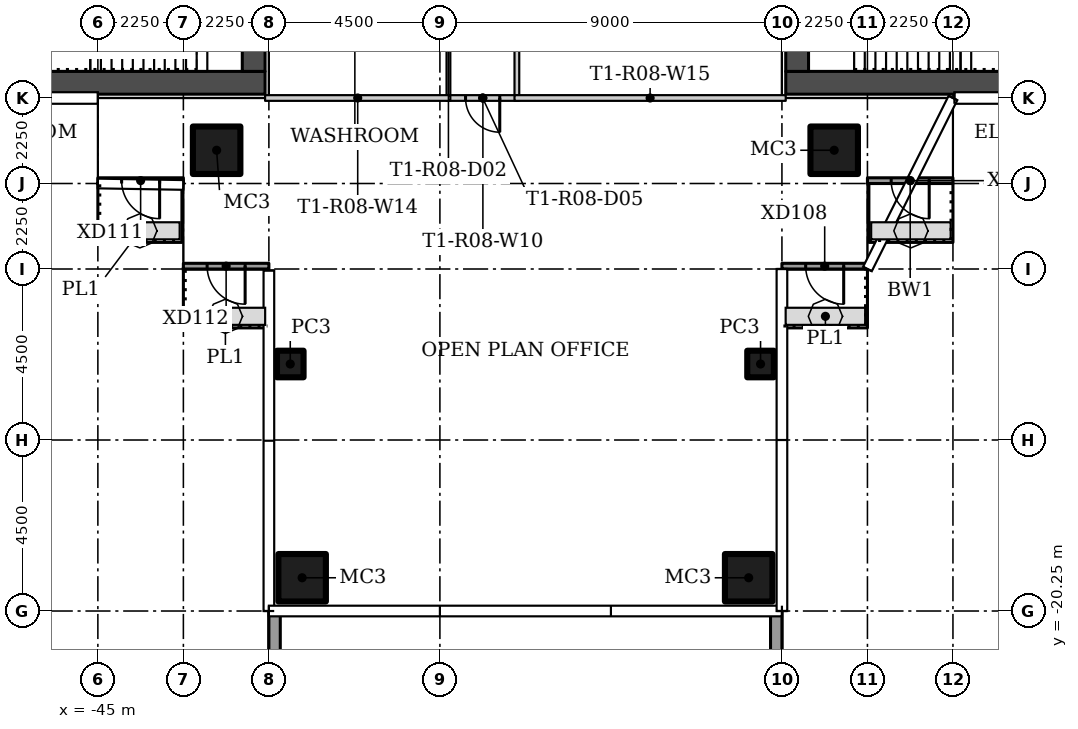
"""IFC4 building model, lengths in metres.
Left out: names, types, materials, properties, quantities, classifications, styles, units other than length and angle.
Written with IfcOpenShell. Run it as: python <this file> out.ifc"""

import sys

from ifc_helpers import new_model, si_unit, direction, frame, frame_2d, origin, origin_2d, place, context, subcontext, project, spatial, rectangle, hollow_rectangle, extrude, element, fill, save


model = new_model("IFC4")
c1 = context("Model", 3, precision=1e-05, world=origin(), true_north=direction((0.0, 1.0)))
c2 = subcontext(c1, "Body", "Model", "MODEL_VIEW")
j1 = project(units=[si_unit("LENGTHUNIT", "METRE"), si_unit("PLANEANGLEUNIT", "RADIAN")], contexts=[c1])
p1 = place(None, origin())
s1 = spatial("IfcSite", under=j1, at=p1, CompositionType="ELEMENT")
p2 = place(p1, origin())
s2 = spatial("IfcBuilding", under=s1, at=p2, CompositionType="ELEMENT")
p3 = place(p2, frame((0.0, 0.0, 81.9)))
s3 = spatial("IfcBuildingStorey", under=s2, at=p3, CompositionType="ELEMENT", Elevation=81.9)
for number, where in (
    (1, (-25.625, -8.125, 0.0)),
    (2, (-41.875, -8.125, 0.0)),
):
    element("IfcColumn", number, at=place(p3, frame(where)), inside=s3, PredefinedType="COLUMN", context=c2, shape_type="SweptSolid", body=[
        extrude(hollow_rectangle(XDim=1.25, YDim=1.25, WallThickness=0.05, at=origin_2d()), origin(), (0.0, 0.0, 1.0), 3.55),
    ])
p4 = place(p3, frame((-39.938, -13.75, 0.0)))
e3 = element("IfcColumn", 3, at=p4, inside=s3, PredefinedType="COLUMN", context=c2, shape_type="SweptSolid", body=[
    extrude(hollow_rectangle(XDim=0.7, YDim=0.7, WallThickness=0.025, at=origin_2d()), origin(), (0.0, 0.0, 1.0), 3.55),
])
p5 = place(p3, frame((-39.625, -19.375, 0.0)))
e4 = element("IfcColumn", 4, at=p5, inside=s3, PredefinedType="COLUMN", context=c2, shape_type="SweptSolid", body=[
    extrude(hollow_rectangle(XDim=1.25, YDim=1.25, WallThickness=0.05, at=origin_2d()), origin(), (0.0, 0.0, 1.0), 3.55),
])
p6 = place(p3, frame((-27.562, -13.75, 0.0)))
e5 = element("IfcColumn", 5, at=p6, inside=s3, PredefinedType="COLUMN", context=c2, shape_type="SweptSolid", body=[
    extrude(hollow_rectangle(XDim=0.7, YDim=0.7, WallThickness=0.025, at=origin_2d()), origin(), (0.0, 0.0, 1.0), 3.55),
])
p7 = place(p3, frame((-27.875, -19.375, 0.0)))
e6 = element("IfcColumn", 6, at=p7, inside=s3, PredefinedType="COLUMN", context=c2, shape_type="SweptSolid", body=[
    extrude(hollow_rectangle(XDim=1.25, YDim=1.25, WallThickness=0.05, at=origin_2d()), origin(), (0.0, 0.0, 1.0), 3.55),
])
p8 = place(p3, frame((-33.975, -0.013, 0.0), z_axis=(0.0, 0.0, 1.0), x_axis=(0.0, -1.0, 0.0)))
e7 = element("IfcWall", 7, at=p8, inside=s3, PredefinedType="PARTITIONING", context=c2, shape_type="SweptSolid", body=[
    extrude(rectangle(XDim=6.662, YDim=0.125, at=frame_2d((3.331, 0.0))), origin(), (0.0, 0.0, 1.0), 3.55),
])
p9 = place(p8, frame((2.887, 0.0, 0.0)))
e8 = element("IfcOpeningElement", 8, at=p9, cuts=e7, PredefinedType="OPENING", context=c2, shape_type="SweptSolid", body=[
    extrude(rectangle(XDim=0.9, YDim=2.1, at=frame_2d((0.45, 1.05))), frame((0.0, 0.073, 0.0), z_axis=(0.0, -1.0, 0.0), x_axis=(1.0, 0.0, 0.0)), (0.0, 0.0, 1.0), 0.145),
])
p10 = place(p3, frame((-35.775, -6.675, 0.0), z_axis=(0.0, 0.0, 1.0), x_axis=(0.0, 1.0, 0.0)))
e9 = element("IfcWall", 9, at=p10, inside=s3, PredefinedType="PARTITIONING", context=c2, shape_type="SweptSolid", body=[
    extrude(rectangle(XDim=6.675, YDim=0.1, at=frame_2d((3.337, 0.0))), origin(), (0.0, 0.0, 1.0), 3.55),
])
p11 = place(p10, frame((1.35, 0.0, 0.0)))
e10 = element("IfcOpeningElement", 10, at=p11, cuts=e9, PredefinedType="OPENING", context=c2, shape_type="SweptSolid", body=[
    extrude(rectangle(XDim=0.9, YDim=2.1, at=frame_2d((0.45, 1.05))), frame((0.0, 0.06, 0.0), z_axis=(0.0, -1.0, 0.0), x_axis=(1.0, 0.0, 0.0)), (0.0, 0.0, 1.0), 0.12),
])
p12 = place(p3, frame((-33.912, -6.75, 0.0), z_axis=(0.0, 0.0, 1.0), x_axis=(-1.0, 0.0, 0.0)))
e11 = element("IfcWall", 11, at=p12, inside=s3, PredefinedType="PARTITIONING", context=c2, shape_type="SweptSolid", body=[
    extrude(rectangle(XDim=1.913, YDim=0.15, at=frame_2d((0.957, 0.0))), origin(), (0.0, 0.0, 1.0), 3.55),
])
p13 = place(p12, frame((0.513, 0.0, 0.0)))
e12 = element("IfcOpeningElement", 12, at=p13, cuts=e11, PredefinedType="OPENING", context=c2, shape_type="SweptSolid", body=[
    extrude(rectangle(XDim=0.9, YDim=2.1, at=frame_2d((0.45, 1.05))), frame((0.0, 0.085, 0.0), z_axis=(0.0, -1.0, 0.0), x_axis=(1.0, 0.0, 0.0)), (0.0, 0.0, 1.0), 0.17),
])
p14 = place(p3, frame((-40.6, -6.75, 0.0)))
e13 = element("IfcWall", 13, at=p14, inside=s3, PredefinedType="PARTITIONING", context=c2, shape_type="SweptSolid", body=[
    extrude(rectangle(XDim=4.875, YDim=0.15, at=frame_2d((2.438, 0.0))), origin(), (0.0, 0.0, 1.0), 3.55),
])
p15 = place(p3, frame((-34.037, -6.75, 0.0)))
e14 = element("IfcWall", 14, at=p15, inside=s3, PredefinedType="PARTITIONING", context=c2, shape_type="SweptSolid", body=[
    extrude(rectangle(XDim=7.137, YDim=0.15, at=frame_2d((3.569, 0.0))), origin(), (0.0, 0.0, 1.0), 3.55),
])
p16 = place(p3, frame((-40.35, -20.25, 0.0), z_axis=(0.0, 0.0, 1.0), x_axis=(0.0, -1.0, 0.0)))
e15 = element("IfcWall", 15, at=p16, inside=s3, PredefinedType="PARAPET", context=c2, shape_type="SweptSolid", body=[
    extrude(rectangle(XDim=4.5, YDim=0.3, at=frame_2d((2.25, 0.0))), origin(), (0.0, 0.0, 1.0), 1.1),
])
p17 = place(p3, frame((-27.15, -24.45, 0.0), z_axis=(0.0, 0.0, 1.0), x_axis=(0.0, 1.0, 0.0)))
e16 = element("IfcWall", 16, at=p17, inside=s3, PredefinedType="PARAPET", context=c2, shape_type="SweptSolid", body=[
    extrude(rectangle(XDim=4.2, YDim=0.3, at=frame_2d((2.1, 0.0))), origin(), (0.0, 0.0, 1.0), 1.1),
])
p18 = place(p3, frame((-22.5, -8.925, 0.0), z_axis=(0.0, 0.0, 1.0), x_axis=(-1.0, 0.0, 0.0)))
e17 = element("IfcWall", 17, at=p18, inside=s3, PredefinedType="SOLIDWALL", context=c2, shape_type="SweptSolid", body=[
    extrude(rectangle(XDim=2.25, YDim=0.15, at=frame_2d((1.125, 0.0))), origin(), (0.0, 0.0, 1.0), 3.45),
])
p19 = place(p18, frame((0.625, 0.0, 0.0)))
e18 = element("IfcOpeningElement", 18, at=p19, cuts=e17, PredefinedType="OPENING", context=c2, shape_type="SweptSolid", body=[
    extrude(rectangle(XDim=1.0, YDim=2.4, at=frame_2d((0.5, 1.2))), frame((0.0, 0.085, 0.0), z_axis=(0.0, -1.0, 0.0), x_axis=(1.0, 0.0, 0.0)), (0.0, 0.0, 1.0), 0.17),
])
p20 = place(p3, frame((-24.75, -11.175, 0.0), z_axis=(0.0, 0.0, 1.0), x_axis=(-1.0, 0.0, 0.0)))
e19 = element("IfcWall", 19, at=p20, inside=s3, PredefinedType="SOLIDWALL", context=c2, shape_type="SweptSolid", body=[
    extrude(rectangle(XDim=2.25, YDim=0.15, at=frame_2d((1.125, 0.0))), origin(), (0.0, 0.0, 1.0), 3.45),
])
p21 = place(p20, frame((0.625, 0.0, 0.0)))
e20 = element("IfcOpeningElement", 20, at=p21, cuts=e19, PredefinedType="OPENING", context=c2, shape_type="SweptSolid", body=[
    extrude(rectangle(XDim=1.0, YDim=2.4, at=frame_2d((0.5, 1.2))), frame((0.0, 0.085, 0.0), z_axis=(0.0, -1.0, 0.0), x_axis=(1.0, 0.0, 0.0)), (0.0, 0.0, 1.0), 0.17),
])
p22 = place(p3, frame((-42.75, -8.925, 0.0), z_axis=(0.0, 0.0, 1.0), x_axis=(-1.0, 0.0, 0.0)))
e21 = element("IfcWall", 21, at=p22, inside=s3, PredefinedType="SOLIDWALL", context=c2, shape_type="SweptSolid", body=[
    extrude(rectangle(XDim=2.25, YDim=0.15, at=frame_2d((1.125, 0.0))), origin(), (0.0, 0.0, 1.0), 3.45),
])
p23 = place(p22, frame((0.625, 0.0, 0.0)))
e22 = element("IfcOpeningElement", 22, at=p23, cuts=e21, PredefinedType="OPENING", context=c2, shape_type="SweptSolid", body=[
    extrude(rectangle(XDim=1.0, YDim=2.4, at=frame_2d((0.5, 1.2))), frame((0.0, 0.085, 0.0), z_axis=(0.0, -1.0, 0.0), x_axis=(1.0, 0.0, 0.0)), (0.0, 0.0, 1.0), 0.17),
])
p24 = place(p3, frame((-40.5, -11.175, 0.0), z_axis=(0.0, 0.0, 1.0), x_axis=(-1.0, 0.0, 0.0)))
e23 = element("IfcWall", 23, at=p24, inside=s3, PredefinedType="SOLIDWALL", context=c2, shape_type="SweptSolid", body=[
    extrude(rectangle(XDim=2.25, YDim=0.15, at=frame_2d((1.125, 0.0))), origin(), (0.0, 0.0, 1.0), 3.45),
])
p25 = place(p24, frame((0.625, 0.0, 0.0)))
e24 = element("IfcOpeningElement", 24, at=p25, cuts=e23, PredefinedType="OPENING", context=c2, shape_type="SweptSolid", body=[
    extrude(rectangle(XDim=1.0, YDim=2.4, at=frame_2d((0.5, 1.2))), frame((0.0, 0.085, 0.0), z_axis=(0.0, -1.0, 0.0), x_axis=(1.0, 0.0, 0.0)), (0.0, 0.0, 1.0), 0.17),
])
p26 = place(p3, frame((-26.9, -6.35, 0.0)))
e25 = element("IfcWall", 25, at=p26, inside=s3, PredefinedType="SHEAR", context=c2, shape_type="SweptSolid", body=[
    extrude(rectangle(XDim=13.3, YDim=0.6, at=frame_2d((6.65, 0.0))), origin(), (0.0, 0.0, 1.0), 3.55),
])
p27 = place(p3, frame((-26.6, 6.05, 0.0), z_axis=(0.0, 0.0, 1.0), x_axis=(0.0, -1.0, 0.0)))
e26 = element("IfcWall", 26, at=p27, inside=s3, PredefinedType="SHEAR", context=c2, shape_type="SweptSolid", body=[
    extrude(rectangle(XDim=12.1, YDim=0.6, at=frame_2d((6.05, 0.0))), origin(), (0.0, 0.0, 1.0), 3.55),
])
p28 = place(p27, frame((3.9, 0.0, 0.0)))
e27 = element("IfcOpeningElement", 27, at=p28, cuts=e26, PredefinedType="OPENING", context=c2, shape_type="SweptSolid", body=[
    extrude(rectangle(XDim=1.8, YDim=2.4, at=frame_2d((0.9, 1.2))), frame((0.0, 0.31, 0.0), z_axis=(0.0, -1.0, 0.0), x_axis=(1.0, 0.0, 0.0)), (0.0, 0.0, 1.0), 0.62),
])
p29 = place(p3, frame((-40.6, -6.35, 0.0), z_axis=(0.0, 0.0, 1.0), x_axis=(-1.0, 0.0, 0.0)))
e28 = element("IfcWall", 28, at=p29, inside=s3, PredefinedType="SHEAR", context=c2, shape_type="SweptSolid", body=[
    extrude(rectangle(XDim=13.3, YDim=0.6, at=frame_2d((6.65, 0.0))), origin(), (0.0, 0.0, 1.0), 3.55),
])
p30 = place(p3, frame((-40.9, -6.05, 0.0), z_axis=(0.0, 0.0, 1.0), x_axis=(0.0, 1.0, 0.0)))
e29 = element("IfcWall", 29, at=p30, inside=s3, PredefinedType="SHEAR", context=c2, shape_type="SweptSolid", body=[
    extrude(rectangle(XDim=12.1, YDim=0.6, at=frame_2d((6.05, 0.0))), origin(), (0.0, 0.0, 1.0), 3.55),
])
p31 = place(p30, frame((6.4, 0.0, 0.0)))
e30 = element("IfcOpeningElement", 30, at=p31, cuts=e29, PredefinedType="OPENING", context=c2, shape_type="SweptSolid", body=[
    extrude(rectangle(XDim=1.8, YDim=2.4, at=frame_2d((0.9, 1.2))), frame((0.0, 0.31, 0.0), z_axis=(0.0, -1.0, 0.0), x_axis=(1.0, 0.0, 0.0)), (0.0, 0.0, 1.0), 0.62),
])
p32 = place(p13, origin())
e31 = element("IfcDoor", 31, at=p32, inside=s3, OperationType="SINGLE_SWING_RIGHT", PredefinedType="DOOR", context=c2, shape_type="SweptSolid", body=[
    extrude(rectangle(XDim=0.9, YDim=2.1, at=frame_2d((0.45, 1.05))), frame((0.0, 0.025, 0.0), z_axis=(0.0, -1.0, 0.0), x_axis=(1.0, 0.0, 0.0)), (0.0, 0.0, 1.0), 0.05),
])
fill(e12, e31)
p33 = place(p19, origin())
e32 = element("IfcDoor", 32, at=p33, inside=s3, OperationType="SINGLE_SWING_RIGHT", PredefinedType="DOOR", context=c2, shape_type="SweptSolid", body=[
    extrude(rectangle(XDim=1.0, YDim=2.4, at=frame_2d((0.5, 1.2))), frame((0.0, 0.025, 0.0), z_axis=(0.0, -1.0, 0.0), x_axis=(1.0, 0.0, 0.0)), (0.0, 0.0, 1.0), 0.05),
])
fill(e18, e32)
p34 = place(p21, origin())
e33 = element("IfcDoor", 33, at=p34, inside=s3, OperationType="SINGLE_SWING_LEFT", PredefinedType="DOOR", context=c2, shape_type="SweptSolid", body=[
    extrude(rectangle(XDim=1.0, YDim=2.4, at=frame_2d((0.5, 1.2))), frame((0.0, 0.025, 0.0), z_axis=(0.0, -1.0, 0.0), x_axis=(1.0, 0.0, 0.0)), (0.0, 0.0, 1.0), 0.05),
])
fill(e20, e33)
p35 = place(p23, origin())
e34 = element("IfcDoor", 34, at=p35, inside=s3, OperationType="SINGLE_SWING_LEFT", PredefinedType="DOOR", context=c2, shape_type="SweptSolid", body=[
    extrude(rectangle(XDim=1.0, YDim=2.4, at=frame_2d((0.5, 1.2))), frame((0.0, 0.025, 0.0), z_axis=(0.0, -1.0, 0.0), x_axis=(1.0, 0.0, 0.0)), (0.0, 0.0, 1.0), 0.05),
])
fill(e22, e34)
p36 = place(p25, origin())
e35 = element("IfcDoor", 35, at=p36, inside=s3, OperationType="SINGLE_SWING_RIGHT", PredefinedType="DOOR", context=c2, shape_type="SweptSolid", body=[
    extrude(rectangle(XDim=1.0, YDim=2.4, at=frame_2d((0.5, 1.2))), frame((0.0, 0.025, 0.0), z_axis=(0.0, -1.0, 0.0), x_axis=(1.0, 0.0, 0.0)), (0.0, 0.0, 1.0), 0.05),
])
fill(e24, e35)
save(model, sys.argv[1])
